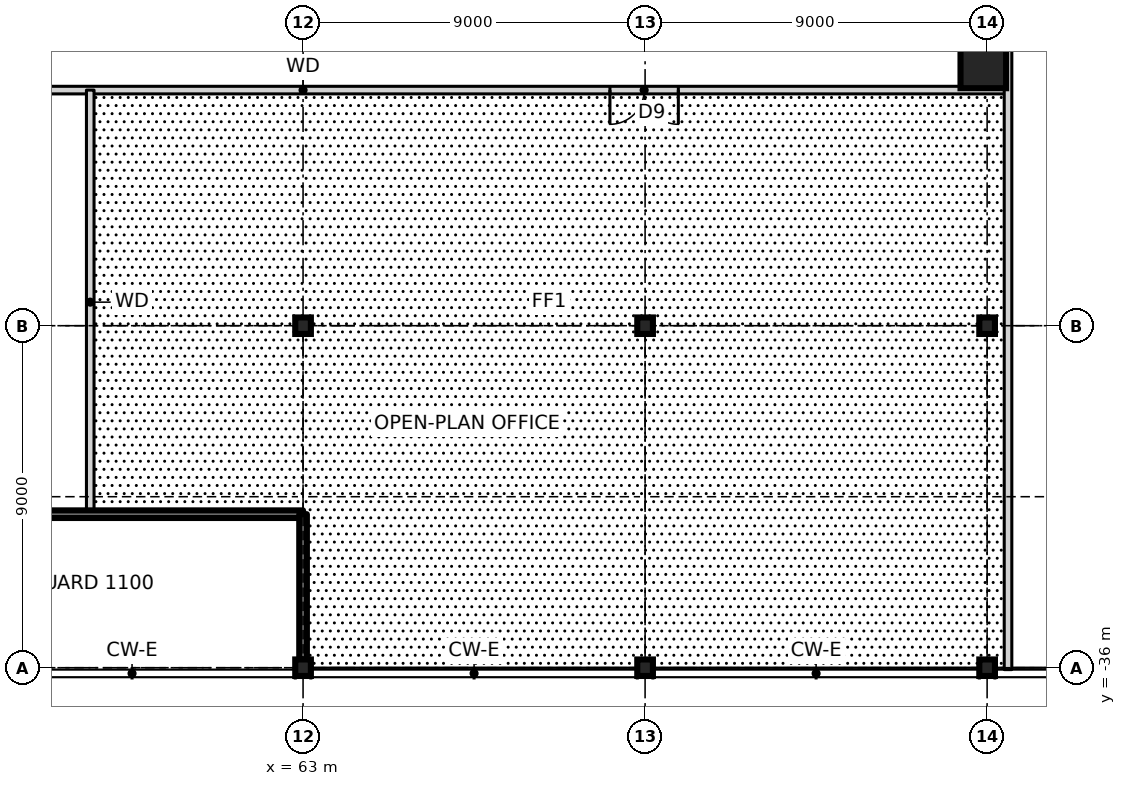
"""IFC4 building model, lengths in metres.
Left out: names, types, materials, properties, quantities, classifications, styles, units other than length and angle.
Written with IfcOpenShell. Run it as: python <this file> out.ifc"""

import sys

from ifc_helpers import new_model, si_unit, direction, frame, frame_2d, origin, origin_2d, place, context, subcontext, project, spatial, rectangle, hollow_rectangle, i_section, extrude, element, fill, save


model = new_model("IFC4")
c1 = context("Model", 3, precision=1e-05, world=origin(), true_north=direction((0.0, 1.0)))
c2 = subcontext(c1, "Body", "Model", "MODEL_VIEW")
j1 = project(units=[si_unit("LENGTHUNIT", "METRE"), si_unit("PLANEANGLEUNIT", "RADIAN")], contexts=[c1])
p1 = place(None, origin())
s1 = spatial("IfcSite", under=j1, at=p1, CompositionType="ELEMENT")
p2 = place(p1, origin())
s2 = spatial("IfcBuilding", under=s1, at=p2, CompositionType="ELEMENT")
p3 = place(p2, frame((0.0, 0.0, 10.5)))
s3 = spatial("IfcBuildingStorey", under=s2, at=p3, CompositionType="ELEMENT", Elevation=10.5)
p4 = place(p3, frame((80.9, -20.15, 0.0), z_axis=(0.0, 0.0, 1.0), x_axis=(1.0, 0.0, 0.0)))
e1 = element("IfcColumn", 1, at=p4, inside=s3, PredefinedType="COLUMN", context=c2, shape_type="SweptSolid", body=[
    extrude(hollow_rectangle(XDim=1.2, YDim=1.2, WallThickness=0.07, at=origin_2d()), origin(), (0.0, 0.0, 1.0), 4.5),
])
for number, where, z_axis, x_axis in (
    (2, (63.0, -36.0, 0.0), (0.0, 0.0, 1.0), (1.0, 0.0, 0.0)),
    (3, (63.0, -27.0, 0.0), (0.0, 0.0, 1.0), (1.0, 0.0, 0.0)),
    (4, (72.0, -36.0, 0.0), (0.0, 0.0, 1.0), (1.0, 0.0, 0.0)),
    (5, (72.0, -27.0, 0.0), (0.0, 0.0, 1.0), (1.0, 0.0, 0.0)),
    (6, (81.0, -36.0, 0.0), (0.0, 0.0, 1.0), (1.0, 0.0, 0.0)),
    (7, (81.0, -27.0, 0.0), (0.0, 0.0, 1.0), (1.0, 0.0, 0.0)),
):
    element("IfcColumn", number, at=place(p3, frame(where, z_axis=z_axis, x_axis=x_axis)), inside=s3, PredefinedType="COLUMN", context=c2, shape_type="SweptSolid", body=[
        extrude(i_section(OverallWidth=0.411, OverallDepth=0.434, WebThickness=0.036, FlangeThickness=0.057, at=origin_2d()), origin(), (0.0, 0.0, 1.0), 4.5),
    ])
p5 = place(p3, frame((54.0, -31.96, 0.0), z_axis=(0.0, 0.0, 1.0), x_axis=(1.0, 0.0, 0.0)))
e8 = element("IfcWall", 8, at=p5, inside=s3, PredefinedType="SOLIDWALL", context=c2, shape_type="SweptSolid", body=[
    extrude(rectangle(XDim=9.0, YDim=0.2, at=frame_2d((4.5, 0.0))), origin(), (0.0, 0.0, 1.0), 4.5),
])
p6 = place(p5, frame((0.25, 0.0, 0.0)))
e9 = element("IfcOpeningElement", 9, at=p6, cuts=e8, PredefinedType="OPENING", context=c2, shape_type="SweptSolid", body=[
    extrude(rectangle(XDim=1.0, YDim=2.1, at=frame_2d((0.5, 1.05))), frame((0.0, 0.11, 0.0), z_axis=(0.0, -1.0, 0.0), x_axis=(1.0, 0.0, 0.0)), (0.0, 0.0, 1.0), 0.22),
])
p7 = place(p3, frame((44.45, -20.8, 0.0), z_axis=(0.0, 0.0, 1.0), x_axis=(1.0, 0.0, 0.0)))
e10 = element("IfcWall", 10, at=p7, inside=s3, PredefinedType="SOLIDWALL", context=c2, shape_type="SweptSolid", body=[
    extrude(rectangle(XDim=37.1, YDim=0.2, at=frame_2d((18.55, 0.0))), origin(), (0.0, 0.0, 1.0), 4.25),
])
p8 = place(p7, frame((3.325, 0.0, 0.0)))
e11 = element("IfcOpeningElement", 11, at=p8, cuts=e10, PredefinedType="OPENING", context=c2, shape_type="SweptSolid", body=[
    extrude(rectangle(XDim=1.8, YDim=2.1, at=frame_2d((0.9, 1.05))), frame((0.0, 0.11, 0.0), z_axis=(0.0, -1.0, 0.0), x_axis=(1.0, 0.0, 0.0)), (0.0, 0.0, 1.0), 0.22),
])
p9 = place(p7, frame((26.625, 0.0, 0.0)))
e12 = element("IfcOpeningElement", 12, at=p9, cuts=e10, PredefinedType="OPENING", context=c2, shape_type="SweptSolid", body=[
    extrude(rectangle(XDim=1.8, YDim=2.1, at=frame_2d((0.9, 1.05))), frame((0.0, 0.11, 0.0), z_axis=(0.0, -1.0, 0.0), x_axis=(1.0, 0.0, 0.0)), (0.0, 0.0, 1.0), 0.22),
])
p10 = place(p7, frame((8.65, 0.0, 0.0)))
e13 = element("IfcOpeningElement", 13, at=p10, cuts=e10, PredefinedType="OPENING", context=c2, shape_type="SweptSolid", body=[
    extrude(rectangle(XDim=1.8, YDim=2.1, at=frame_2d((0.9, 1.05))), frame((0.0, 0.11, 0.0), z_axis=(0.0, -1.0, 0.0), x_axis=(1.0, 0.0, 0.0)), (0.0, 0.0, 1.0), 0.22),
])
p11 = place(p3, frame((81.55, -36.05, 0.0), z_axis=(0.0, 0.0, 1.0), x_axis=(0.0, 1.0, 0.0)))
e14 = element("IfcWall", 14, at=p11, inside=s3, PredefinedType="SOLIDWALL", context=c2, shape_type="SweptSolid", body=[
    extrude(rectangle(XDim=72.1, YDim=0.2, at=frame_2d((36.05, 0.0))), origin(), (0.0, 0.0, 1.0), 4.25),
])
p12 = place(p11, frame((66.65, 0.0, 0.0)))
e15 = element("IfcOpeningElement", 15, at=p12, cuts=e14, PredefinedType="OPENING", context=c2, shape_type="SweptSolid", body=[
    extrude(rectangle(XDim=1.8, YDim=2.1, at=frame_2d((0.9, 1.05))), frame((0.0, 0.11, 0.0), z_axis=(0.0, -1.0, 0.0), x_axis=(1.0, 0.0, 0.0)), (0.0, 0.0, 1.0), 0.22),
])
p13 = place(p11, frame((23.05, 0.0, 0.0)))
e16 = element("IfcOpeningElement", 16, at=p13, cuts=e14, PredefinedType="OPENING", context=c2, shape_type="SweptSolid", body=[
    extrude(rectangle(XDim=1.8, YDim=2.1, at=frame_2d((0.9, 1.05))), frame((0.0, 0.11, 0.0), z_axis=(0.0, -1.0, 0.0), x_axis=(1.0, 0.0, 0.0)), (0.0, 0.0, 1.0), 0.22),
])
p14 = place(p11, frame((35.45, 0.0, 0.0)))
e17 = element("IfcOpeningElement", 17, at=p14, cuts=e14, PredefinedType="OPENING", context=c2, shape_type="SweptSolid", body=[
    extrude(rectangle(XDim=1.8, YDim=2.1, at=frame_2d((0.9, 1.05))), frame((0.0, 0.11, 0.0), z_axis=(0.0, -1.0, 0.0), x_axis=(1.0, 0.0, 0.0)), (0.0, 0.0, 1.0), 0.22),
])
p15 = place(p11, frame((47.55, 0.0, 0.0)))
e18 = element("IfcOpeningElement", 18, at=p15, cuts=e14, PredefinedType="OPENING", context=c2, shape_type="SweptSolid", body=[
    extrude(rectangle(XDim=1.8, YDim=2.1, at=frame_2d((0.9, 1.05))), frame((0.0, 0.11, 0.0), z_axis=(0.0, -1.0, 0.0), x_axis=(1.0, 0.0, 0.0)), (0.0, 0.0, 1.0), 0.22),
])
p16 = place(p3, frame((63.0, -35.783, 0.0), z_axis=(0.0, 0.0, 1.0), x_axis=(0.0, 1.0, 0.0)))
e19 = element("IfcWall", 19, at=p16, inside=s3, PredefinedType="SOLIDWALL", context=c2, shape_type="SweptSolid", body=[
    extrude(rectangle(XDim=3.823, YDim=0.2, at=frame_2d((1.911, 0.0))), origin(), (0.0, 0.0, 1.0), 4.5),
])
p17 = place(p3, frame((57.4, -31.96, 0.0), z_axis=(0.0, 0.0, 1.0), x_axis=(0.0, 1.0, 0.0)))
e20 = element("IfcWall", 20, at=p17, inside=s3, PredefinedType="SOLIDWALL", context=c2, shape_type="SweptSolid", body=[
    extrude(rectangle(XDim=11.16, YDim=0.2, at=frame_2d((5.58, 0.0))), origin(), (0.0, 0.0, 1.0), 4.25),
])
p18 = place(p9, frame((1.8, 0.0, 0.0), z_axis=(0.0, 0.0, 1.0), x_axis=(-1.0, 0.0, 0.0)))
e21 = element("IfcDoor", 21, at=p18, inside=s3, OperationType="DOUBLE_DOOR_SINGLE_SWING", PredefinedType="DOOR", context=c2, shape_type="SweptSolid", body=[
    extrude(rectangle(XDim=1.8, YDim=2.1, at=frame_2d((0.9, 1.05))), frame((0.0, 0.025, 0.0), z_axis=(0.0, -1.0, 0.0), x_axis=(1.0, 0.0, 0.0)), (0.0, 0.0, 1.0), 0.05),
])
fill(e12, e21)
save(model, sys.argv[1])
